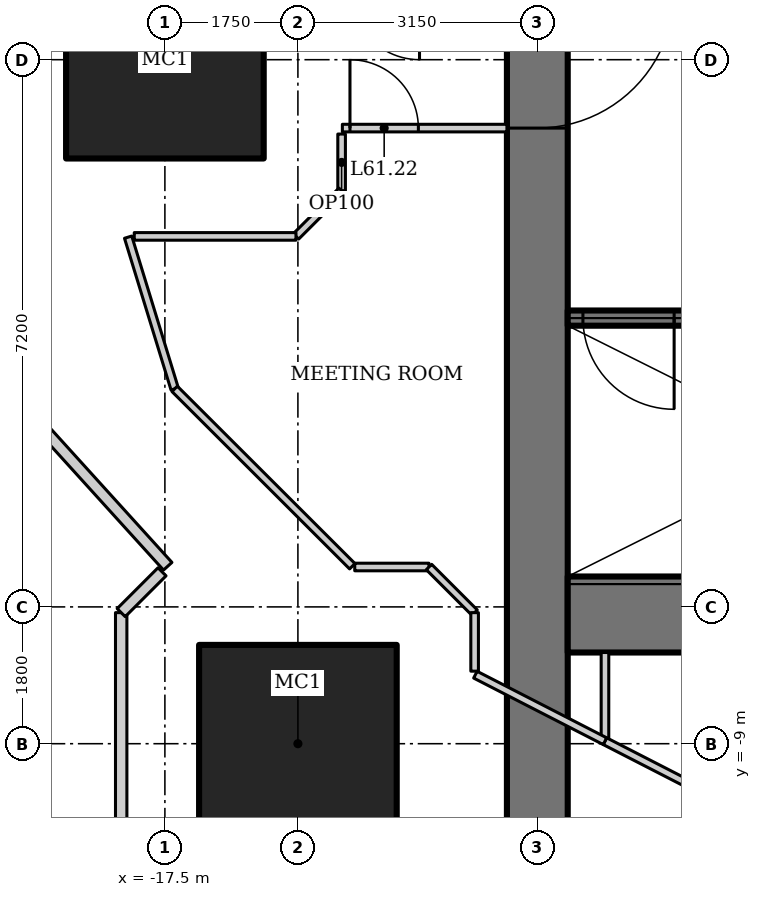
"""IFC4 building model, lengths in metres.
Left out: names, types, materials, properties, quantities, classifications, styles, units other than length and angle.
Written with IfcOpenShell. Run it as: python <this file> out.ifc"""

import sys

from ifc_helpers import new_model, si_unit, direction, frame, frame_2d, origin, origin_2d, place, context, subcontext, project, spatial, rectangle, hollow_rectangle, extrude, element, fill, save


model = new_model("IFC4")
c1 = context("Model", 3, precision=1e-05, world=origin(), true_north=direction((0.0, 1.0)))
c2 = subcontext(c1, "Body", "Model", "MODEL_VIEW")
j1 = project(units=[si_unit("LENGTHUNIT", "METRE"), si_unit("PLANEANGLEUNIT", "RADIAN")], contexts=[c1])
p1 = place(None, origin())
s1 = spatial("IfcSite", under=j1, at=p1, CompositionType="ELEMENT")
p2 = place(p1, origin())
s2 = spatial("IfcBuilding", under=s1, at=p2, CompositionType="ELEMENT")
p3 = place(p2, frame((0.0, 0.0, 262.0)))
s3 = spatial("IfcBuildingStorey", under=s2, at=p3, CompositionType="ELEMENT", Elevation=262.0)
for number, where, z_axis, x_axis in (
    (1, (-17.5, 0.0, 0.0), (0.0, 0.0, 1.0), (1.0, 0.0, 0.0)),
    (2, (-15.75, -9.0, 0.0), (0.0, 0.0, 1.0), (1.0, 0.0, 0.0)),
):
    element("IfcColumn", number, at=place(p3, frame(where, z_axis=z_axis, x_axis=x_axis)), inside=s3, PredefinedType="COLUMN", context=c2, shape_type="SweptSolid", body=[
        extrude(hollow_rectangle(XDim=2.6, YDim=2.6, WallThickness=0.13, at=origin_2d()), origin(), (0.0, 0.0, 1.0), 4.2),
    ])
p4 = place(p3, frame((-12.6, 11.0, 0.0), z_axis=(0.0, 0.0, 1.0), x_axis=(0.0, -1.0, 0.0)))
e3 = element("IfcWall", 3, at=p4, inside=s3, PredefinedType="SHEAR", context=c2, shape_type="SweptSolid", body=[
    extrude(rectangle(XDim=22.0, YDim=0.8, at=frame_2d((11.0, 0.0))), origin(), (0.0, 0.0, 1.0), 4.2),
])
p5 = place(p4, frame((10.1, 0.0, 0.0)))
e4 = element("IfcOpeningElement", 4, at=p5, cuts=e3, PredefinedType="OPENING", context=c2, shape_type="SweptSolid", body=[
    extrude(rectangle(XDim=1.8, YDim=2.1, at=frame_2d((0.9, 1.05))), frame((0.0, 0.41, 0.0), z_axis=(0.0, -1.0, 0.0), x_axis=(1.0, 0.0, 0.0)), (0.0, 0.0, 1.0), 0.82),
])
p6 = place(p3, frame((-12.2, -7.3, 0.0), z_axis=(0.0, 0.0, 1.0), x_axis=(1.0, 0.0, 0.0)))
e5 = element("IfcWall", 5, at=p6, inside=s3, PredefinedType="SHEAR", context=c2, shape_type="SweptSolid", body=[
    extrude(rectangle(XDim=24.4, YDim=1.0, at=frame_2d((12.2, 0.0))), origin(), (0.0, 0.0, 1.0), 4.2),
])
p7 = place(p3, frame((-5.6, -3.4, 0.0), z_axis=(0.0, 0.0, 1.0), x_axis=(-1.0, 0.0, 0.0)))
e6 = element("IfcWall", 6, at=p7, inside=s3, PredefinedType="SHEAR", context=c2, shape_type="SweptSolid", body=[
    extrude(rectangle(XDim=6.6, YDim=0.2, at=frame_2d((3.3, 0.0))), origin(), (0.0, 0.0, 1.0), 4.2),
])
p8 = place(p7, frame((5.2, 0.0, 0.0)))
e7 = element("IfcOpeningElement", 7, at=p8, cuts=e6, PredefinedType="OPENING", context=c2, shape_type="SweptSolid", body=[
    extrude(rectangle(XDim=1.2, YDim=2.1, at=frame_2d((0.6, 1.05))), frame((0.0, 0.11, 0.0), z_axis=(0.0, -1.0, 0.0), x_axis=(1.0, 0.0, 0.0)), (0.0, 0.0, 1.0), 0.22),
])
p9 = place(p3, frame((-11.71, -7.8, 0.0), z_axis=(0.0, 0.0, 1.0), x_axis=(0.0, -1.0, 0.0)))
e8 = element("IfcWall", 8, at=p9, inside=s3, PredefinedType="PARTITIONING", context=c2, shape_type="SweptSolid", body=[
    extrude(rectangle(XDim=1.167, YDim=0.1, at=frame_2d((0.583, 0.0))), origin(), (0.0, 0.0, 1.0), 4.05),
])
p10 = place(p3, frame((-9.67, -10.014, 0.0), z_axis=(0.0, 0.0, 1.0), x_axis=(-0.889605609385, 0.456729525814, 0.0)))
e9 = element("IfcWall", 9, at=p10, inside=s3, PredefinedType="PARTITIONING", context=c2, shape_type="SweptSolid", body=[
    extrude(rectangle(XDim=2.293, YDim=0.1, at=frame_2d((1.146, 0.0))), origin(), (0.0, 0.0, 1.0), 4.05),
])
p11 = place(p3, frame((-17.372, -4.331, 0.0), z_axis=(0.0, 0.0, 1.0), x_axis=(-0.293231279211, 0.956041535129, 0.0)))
e10 = element("IfcWall", 10, at=p11, inside=s3, PredefinedType="PARTITIONING", context=c2, shape_type="SweptSolid", body=[
    extrude(rectangle(XDim=2.088, YDim=0.1, at=frame_2d((1.044, 0.0))), origin(), (0.0, 0.0, 1.0), 4.05),
])
p12 = place(p3, frame((-15.165, -0.9, 0.0), z_axis=(0.0, 0.0, 1.0), x_axis=(1.0, 0.0, 0.0)))
e11 = element("IfcWall", 11, at=p12, inside=s3, PredefinedType="PARTITIONING", context=c2, shape_type="SweptSolid", body=[
    extrude(rectangle(XDim=2.165, YDim=0.1, at=frame_2d((1.083, 0.0))), origin(), (0.0, 0.0, 1.0), 4.05),
])
p13 = place(p12, frame((0.1, 0.0, 0.0)))
e12 = element("IfcOpeningElement", 12, at=p13, cuts=e11, PredefinedType="OPENING", context=c2, shape_type="SweptSolid", body=[
    extrude(rectangle(XDim=0.9, YDim=2.1, at=frame_2d((0.45, 1.05))), frame((0.0, 0.06, 0.0), z_axis=(0.0, -1.0, 0.0), x_axis=(1.0, 0.0, 0.0)), (0.0, 0.0, 1.0), 0.12),
])
p14 = place(p3, frame((-15.175, -0.978, 0.0), z_axis=(0.0, 0.0, 1.0), x_axis=(0.0, -1.0, 0.0)))
e13 = element("IfcWall", 13, at=p14, inside=s3, PredefinedType="PARTITIONING", context=c2, shape_type="SweptSolid", body=[
    extrude(rectangle(XDim=0.746, YDim=0.1, at=frame_2d((0.373, 0.0))), origin(), (0.0, 0.0, 1.0), 4.05),
])
p15 = place(p3, frame((-15.175, -1.725, 0.0), z_axis=(0.0, 0.0, 1.0), x_axis=(-0.707106781187, -0.707106781187, 0.0)))
e14 = element("IfcWall", 14, at=p15, inside=s3, PredefinedType="PARTITIONING", context=c2, shape_type="SweptSolid", body=[
    extrude(rectangle(XDim=0.849, YDim=0.1, at=frame_2d((0.425, 0.0))), origin(), (0.0, 0.0, 1.0), 4.05),
])
p16 = place(p3, frame((-15.775, -2.325, 0.0), z_axis=(0.0, 0.0, 1.0), x_axis=(-1.0, 0.0, 0.0)))
e15 = element("IfcWall", 15, at=p16, inside=s3, PredefinedType="PARTITIONING", context=c2, shape_type="SweptSolid", body=[
    extrude(rectangle(XDim=2.128, YDim=0.1, at=frame_2d((1.064, 0.0))), origin(), (0.0, 0.0, 1.0), 4.05),
])
p17 = place(p3, frame((-19.172, -4.78, 0.0), z_axis=(0.0, 0.0, 1.0), x_axis=(0.671721890643, -0.74080341632, 0.0)))
e16 = element("IfcWall", 16, at=p17, inside=s3, PredefinedType="PARTITIONING", context=c2, shape_type="SweptSolid", body=[
    extrude(rectangle(XDim=2.544, YDim=0.15, at=frame_2d((1.272, 0.0))), origin(), (0.0, 0.0, 1.0), 4.05),
])
p18 = place(p3, frame((-11.71, -8.967, 0.0), z_axis=(0.0, 0.0, 1.0), x_axis=(-0.889638356137, 0.456665736935, 0.0)))
e17 = element("IfcWall", 17, at=p18, inside=s3, PredefinedType="PARTITIONING", context=c2, shape_type="SweptSolid", body=[
    extrude(rectangle(XDim=1.917, YDim=0.1, at=frame_2d((0.958, 0.0))), origin(), (0.0, 0.0, 1.0), 4.05),
])
p19 = place(p3, frame((-15.035, -6.665, 0.0), z_axis=(0.0, 0.0, 1.0), x_axis=(-0.707587114823, 0.70662612104, 0.0)))
e18 = element("IfcWall", 18, at=p19, inside=s3, PredefinedType="PARTITIONING", context=c2, shape_type="SweptSolid", body=[
    extrude(rectangle(XDim=3.303, YDim=0.1, at=frame_2d((1.651, 0.0))), origin(), (0.0, 0.0, 1.0), 4.05),
])
p20 = place(p3, frame((-15.002, -6.675, 0.0), z_axis=(0.0, 0.0, 1.0), x_axis=(1.0, 0.0, 0.0)))
e19 = element("IfcWall", 19, at=p20, inside=s3, PredefinedType="PARTITIONING", context=c2, shape_type="SweptSolid", body=[
    extrude(rectangle(XDim=0.977, YDim=0.1, at=frame_2d((0.488, 0.0))), origin(), (0.0, 0.0, 1.0), 4.05),
])
p21 = place(p3, frame((-14.025, -6.675, 0.0), z_axis=(0.0, 0.0, 1.0), x_axis=(0.707106781187, -0.707106781187, 0.0)))
e20 = element("IfcWall", 20, at=p21, inside=s3, PredefinedType="PARTITIONING", context=c2, shape_type="SweptSolid", body=[
    extrude(rectangle(XDim=0.849, YDim=0.1, at=frame_2d((0.425, 0.0))), origin(), (0.0, 0.0, 1.0), 4.05),
])
p22 = place(p3, frame((-13.425, -7.275, 0.0), z_axis=(0.0, 0.0, 1.0), x_axis=(0.0, -1.0, 0.0)))
e21 = element("IfcWall", 21, at=p22, inside=s3, PredefinedType="PARTITIONING", context=c2, shape_type="SweptSolid", body=[
    extrude(rectangle(XDim=0.77, YDim=0.1, at=frame_2d((0.385, 0.0))), origin(), (0.0, 0.0, 1.0), 4.05),
])
p23 = place(p3, frame((-18.075, -10.725, 0.0), z_axis=(0.0, 0.0, 1.0), x_axis=(0.0, 1.0, 0.0)))
e22 = element("IfcWall", 22, at=p23, inside=s3, PredefinedType="PARTITIONING", context=c2, shape_type="SweptSolid", body=[
    extrude(rectangle(XDim=3.449, YDim=0.15, at=frame_2d((1.725, 0.0))), origin(), (0.0, 0.0, 1.0), 3.6),
])
p24 = place(p3, frame((-18.075, -7.275, 0.0), z_axis=(0.0, 0.0, 1.0), x_axis=(0.707106781187, 0.707106781187, 0.0)))
e23 = element("IfcWall", 23, at=p24, inside=s3, PredefinedType="PARTITIONING", context=c2, shape_type="SweptSolid", body=[
    extrude(rectangle(XDim=0.76, YDim=0.15, at=frame_2d((0.38, 0.0))), origin(), (0.0, 0.0, 1.0), 4.05),
])
p25 = place(p8, origin())
e24 = element("IfcDoor", 24, at=p25, inside=s3, OperationType="SINGLE_SWING_RIGHT", PredefinedType="DOOR", context=c2, shape_type="SweptSolid", body=[
    extrude(rectangle(XDim=1.2, YDim=2.1, at=frame_2d((0.6, 1.05))), frame((0.0, 0.025, 0.0), z_axis=(0.0, -1.0, 0.0), x_axis=(1.0, 0.0, 0.0)), (0.0, 0.0, 1.0), 0.05),
])
fill(e7, e24)
p26 = place(p5, origin())
e25 = element("IfcDoor", 25, at=p26, inside=s3, OperationType="DOUBLE_DOOR_DOUBLE_SWING", PredefinedType="DOOR", context=c2, shape_type="SweptSolid", body=[
    extrude(rectangle(XDim=1.8, YDim=2.1, at=frame_2d((0.9, 1.05))), frame((0.0, 0.025, 0.0), z_axis=(0.0, -1.0, 0.0), x_axis=(1.0, 0.0, 0.0)), (0.0, 0.0, 1.0), 0.05),
])
fill(e4, e25)
p27 = place(p13, origin())
e26 = element("IfcDoor", 26, at=p27, inside=s3, OperationType="SINGLE_SWING_LEFT", PredefinedType="DOOR", context=c2, shape_type="SweptSolid", body=[
    extrude(rectangle(XDim=0.9, YDim=2.1, at=frame_2d((0.45, 1.05))), frame((0.0, 0.025, 0.0), z_axis=(0.0, -1.0, 0.0), x_axis=(1.0, 0.0, 0.0)), (0.0, 0.0, 1.0), 0.05),
])
fill(e12, e26)
save(model, sys.argv[1])
